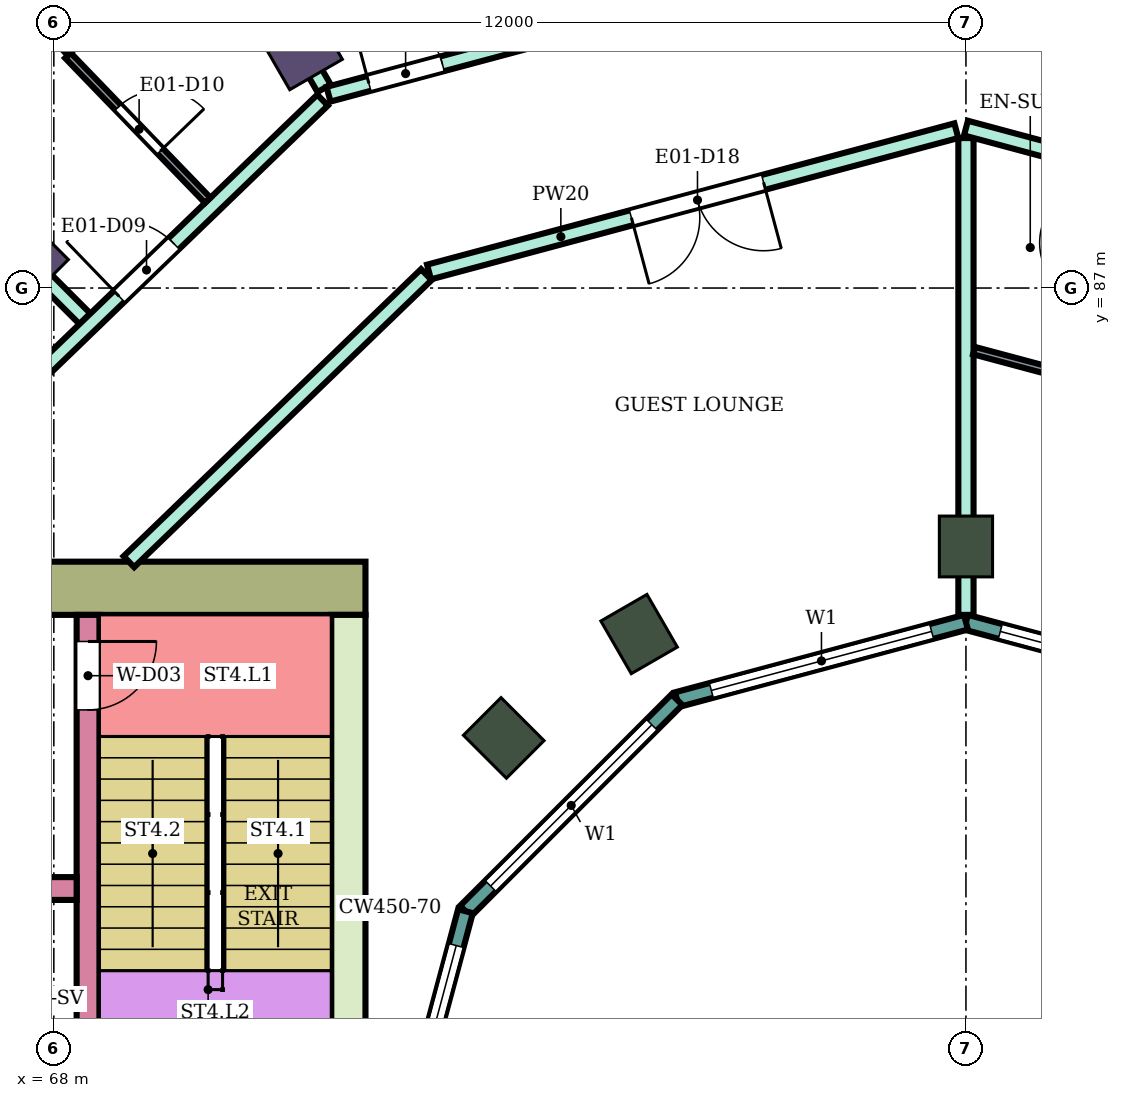
"""IFC4 building model, lengths in metres.
Left out: names, types, materials, properties, quantities, classifications, styles, units other than length and angle.
Written with IfcOpenShell. Run it as: python <this file> out.ifc"""

import sys

from ifc_helpers import new_model, si_unit, direction, frame, frame_2d, origin, origin_2d, place, context, subcontext, project, spatial, rectangle, extrude, element, fill, save


model = new_model("IFC4")
c1 = context("Model", 3, precision=1e-05, world=origin(), true_north=direction((0.0, 1.0)))
c2 = subcontext(c1, "Body", "Model", "MODEL_VIEW")
j1 = project(units=[si_unit("LENGTHUNIT", "METRE"), si_unit("PLANEANGLEUNIT", "RADIAN")], contexts=[c1])
p1 = place(None, origin())
s1 = spatial("IfcSite", under=j1, at=p1, CompositionType="ELEMENT")
p2 = place(p1, origin())
s2 = spatial("IfcBuilding", under=s1, at=p2, CompositionType="ELEMENT")
p3 = place(p2, frame((0.0, 0.0, 114.6)))
s3 = spatial("IfcBuildingStorey", under=s2, at=p3, CompositionType="ELEMENT", Elevation=114.6)
for number, where, z_axis, x_axis in (
    (1, (71.2, 90.242, 0.0), (0.0, 0.0, 1.0), (-0.5, 0.866, 0.0)),
    (2, (67.555, 87.445, 0.0), (0.0, 0.0, 1.0), (-0.707, 0.707, 0.0)),
):
    element("IfcColumn", number, at=place(p3, frame(where, z_axis=z_axis, x_axis=x_axis)), inside=s3, PredefinedType="COLUMN", context=c2, shape_type="SweptSolid", body=[
        extrude(rectangle(XDim=1.0, YDim=0.8, at=origin_2d()), origin(), (0.0, 0.0, 1.0), 3.9),
    ])
for number, where, z_axis, x_axis in (
    (3, (80.0, 83.6, 0.0), (0.0, 0.0, 1.0), (0.0, 1.0, 0.0)),
    (4, (75.7, 82.448, 0.0), (0.0, 0.0, 1.0), (-0.5, 0.866, 0.0)),
    (5, (73.919, 81.081, 0.0), (0.0, 0.0, 1.0), (-0.707, 0.707, 0.0)),
):
    element("IfcColumn", number, at=place(p3, frame(where, z_axis=z_axis, x_axis=x_axis)), inside=s3, PredefinedType="COLUMN", context=c2, shape_type="SweptSolid", body=[
        extrude(rectangle(XDim=0.8, YDim=0.7, at=origin_2d()), origin(), (0.0, 0.0, 1.0), 3.9),
    ])
p4 = place(p3, frame((72.1, 83.05, 0.0), z_axis=(0.0, 0.0, 1.0), x_axis=(-1.0, 0.0, 0.0)))
e6 = element("IfcWall", 6, at=p4, inside=s3, PredefinedType="SHEAR", context=c2, shape_type="SweptSolid", body=[
    extrude(rectangle(XDim=14.8, YDim=0.7, at=frame_2d((7.4, 0.0))), origin(), (0.0, 0.0, 1.0), 3.58),
])
p5 = place(p4, frame((4.2, 0.0, 0.0)))
e7 = element("IfcOpeningElement", 7, at=p5, cuts=e6, PredefinedType="OPENING", context=c2, shape_type="SweptSolid", body=[
    extrude(rectangle(XDim=2.4, YDim=2.4, at=frame_2d((1.2, 1.2))), frame((0.0, 0.36, 0.0), z_axis=(0.0, -1.0, 0.0), x_axis=(1.0, 0.0, 0.0)), (0.0, 0.0, 1.0), 0.72),
])
p6 = place(p3, frame((71.875, 82.7, 0.0), z_axis=(0.0, 0.0, 1.0), x_axis=(0.0, -1.0, 0.0)))
e8 = element("IfcWall", 8, at=p6, inside=s3, PredefinedType="SHEAR", context=c2, shape_type="SweptSolid", body=[
    extrude(rectangle(XDim=7.7, YDim=0.45, at=frame_2d((3.85, 0.0))), origin(), (0.0, 0.0, 1.0), 3.58),
])
p7 = place(p3, frame((68.45, 82.7, 0.0), z_axis=(0.0, 0.0, 1.0), x_axis=(0.0, -1.0, 0.0)))
e9 = element("IfcWall", 9, at=p7, inside=s3, PredefinedType="SHEAR", context=c2, shape_type="SweptSolid", body=[
    extrude(rectangle(XDim=7.7, YDim=0.3, at=frame_2d((3.85, 0.0))), origin(), (0.0, 0.0, 1.0), 3.58),
])
p8 = place(p7, frame((0.35, 0.0, 0.0)))
e10 = element("IfcOpeningElement", 10, at=p8, cuts=e9, PredefinedType="OPENING", context=c2, shape_type="SweptSolid", body=[
    extrude(rectangle(XDim=0.9, YDim=2.1, at=frame_2d((0.45, 1.05))), frame((0.0, 0.16, 0.0), z_axis=(0.0, -1.0, 0.0), x_axis=(1.0, 0.0, 0.0)), (0.0, 0.0, 1.0), 0.32),
])
p9 = place(p3, frame((68.3, 79.1, 0.0), z_axis=(0.0, 0.0, 1.0), x_axis=(-1.0, 0.0, 0.0)))
e11 = element("IfcWall", 11, at=p9, inside=s3, PredefinedType="SHEAR", context=c2, shape_type="SweptSolid", body=[
    extrude(rectangle(XDim=11.0, YDim=0.3, at=frame_2d((5.5, 0.0))), origin(), (0.0, 0.0, 1.0), 3.58),
])
p10 = place(p9, frame((0.4, 0.0, 0.0)))
e12 = element("IfcOpeningElement", 12, at=p10, cuts=e11, PredefinedType="OPENING", context=c2, shape_type="SweptSolid", body=[
    extrude(rectangle(XDim=1.4, YDim=2.1, at=frame_2d((0.7, 1.05))), frame((0.0, 0.16, 0.0), z_axis=(0.0, -1.0, 0.0), x_axis=(1.0, 0.0, 0.0)), (0.0, 0.0, 1.0), 0.32),
])
p11 = place(p9, frame((5.4, 0.0, 0.0)))
e13 = element("IfcOpeningElement", 13, at=p11, cuts=e11, PredefinedType="OPENING", context=c2, shape_type="SweptSolid", body=[
    extrude(rectangle(XDim=1.4, YDim=2.1, at=frame_2d((0.7, 1.05))), frame((0.0, 0.16, 0.0), z_axis=(0.0, -1.0, 0.0), x_axis=(1.0, 0.0, 0.0)), (0.0, 0.0, 1.0), 0.32),
])
p12 = place(p9, frame((8.1, 0.0, 0.0)))
e14 = element("IfcOpeningElement", 14, at=p12, cuts=e11, PredefinedType="OPENING", context=c2, shape_type="SweptSolid", body=[
    extrude(rectangle(XDim=1.0, YDim=2.1, at=frame_2d((0.5, 1.05))), frame((0.0, 0.16, 0.0), z_axis=(0.0, -1.0, 0.0), x_axis=(1.0, 0.0, 0.0)), (0.0, 0.0, 1.0), 0.32),
])
p13 = place(p3, frame((83.802, 81.585, 0.0), z_axis=(0.0, 0.0, 1.0), x_axis=(-0.965933654434, 0.258789828301, 0.0)))
e15 = element("IfcWall", 15, at=p13, inside=s3, PredefinedType="NOTDEFINED", context=c2, shape_type="SweptSolid", body=[
    extrude(rectangle(XDim=3.936, YDim=0.2, at=frame_2d((1.968, 0.0))), origin(), (0.0, 0.0, 1.0), 3.9),
])
p14 = place(p13, frame((0.468, 0.0, 0.9)))
e16 = element("IfcOpeningElement", 16, at=p14, cuts=e15, PredefinedType="OPENING", context=c2, shape_type="SweptSolid", body=[
    extrude(rectangle(XDim=3.0, YDim=2.3, at=frame_2d((1.5, 1.15))), frame((0.0, 0.11, 0.0), z_axis=(0.0, -1.0, 0.0), x_axis=(1.0, 0.0, 0.0)), (0.0, 0.0, 1.0), 0.22),
])
p15 = place(p3, frame((80.0, 82.604, 0.0), z_axis=(0.0, 0.0, 1.0), x_axis=(-0.965933654434, -0.258789828301, 0.0)))
e17 = element("IfcWall", 17, at=p15, inside=s3, PredefinedType="NOTDEFINED", context=c2, shape_type="SweptSolid", body=[
    extrude(rectangle(XDim=3.936, YDim=0.2, at=frame_2d((1.968, 0.0))), origin(), (0.0, 0.0, 1.0), 3.9),
])
p16 = place(p15, frame((0.468, 0.0, 0.9)))
e18 = element("IfcOpeningElement", 18, at=p16, cuts=e17, PredefinedType="OPENING", context=c2, shape_type="SweptSolid", body=[
    extrude(rectangle(XDim=3.0, YDim=2.3, at=frame_2d((1.5, 1.15))), frame((0.0, 0.11, 0.0), z_axis=(0.0, -1.0, 0.0), x_axis=(1.0, 0.0, 0.0)), (0.0, 0.0, 1.0), 0.22),
])
p17 = place(p3, frame((76.198, 81.585, 0.0), z_axis=(0.0, 0.0, 1.0), x_axis=(-0.707106781187, -0.707106781187, 0.0)))
e19 = element("IfcWall", 19, at=p17, inside=s3, PredefinedType="NOTDEFINED", context=c2, shape_type="SweptSolid", body=[
    extrude(rectangle(XDim=3.936, YDim=0.2, at=frame_2d((1.968, 0.0))), origin(), (0.0, 0.0, 1.0), 3.9),
])
p18 = place(p17, frame((0.468, 0.0, 0.9)))
e20 = element("IfcOpeningElement", 20, at=p18, cuts=e19, PredefinedType="OPENING", context=c2, shape_type="SweptSolid", body=[
    extrude(rectangle(XDim=3.0, YDim=2.3, at=frame_2d((1.5, 1.15))), frame((0.0, 0.11, 0.0), z_axis=(0.0, -1.0, 0.0), x_axis=(1.0, 0.0, 0.0)), (0.0, 0.0, 1.0), 0.22),
])
p19 = place(p3, frame((73.415, 78.802, 0.0), z_axis=(0.0, 0.0, 1.0), x_axis=(-0.258789828301, -0.965933654434, 0.0)))
e21 = element("IfcWall", 21, at=p19, inside=s3, PredefinedType="NOTDEFINED", context=c2, shape_type="SweptSolid", body=[
    extrude(rectangle(XDim=3.936, YDim=0.2, at=frame_2d((1.968, 0.0))), origin(), (0.0, 0.0, 1.0), 3.9),
])
p20 = place(p19, frame((0.468, 0.0, 0.9)))
e22 = element("IfcOpeningElement", 22, at=p20, cuts=e21, PredefinedType="OPENING", context=c2, shape_type="SweptSolid", body=[
    extrude(rectangle(XDim=3.0, YDim=2.3, at=frame_2d((1.5, 1.15))), frame((0.0, 0.11, 0.0), z_axis=(0.0, -1.0, 0.0), x_axis=(1.0, 0.0, 0.0)), (0.0, 0.0, 1.0), 0.22),
])
p21 = place(p3, frame((63.598, 91.408, 0.0), z_axis=(0.0, 0.0, 1.0), x_axis=(0.706963264491, -0.707250268759, 0.0)))
e23 = element("IfcWall", 23, at=p21, inside=s3, PredefinedType="PARTITIONING", context=c2, shape_type="SweptSolid", body=[
    extrude(rectangle(XDim=6.805, YDim=0.2, at=frame_2d((3.403, 0.0))), origin(), (0.0, 0.0, 1.0), 3.45),
])
p22 = place(p3, frame((66.797, 84.9, 0.0), z_axis=(0.0, 0.0, 1.0), x_axis=(0.719692092412, 0.694293376116, 0.0)))
e24 = element("IfcWall", 24, at=p22, inside=s3, PredefinedType="PARTITIONING", context=c2, shape_type="SweptSolid", body=[
    extrude(rectangle(XDim=6.584, YDim=0.2, at=frame_2d((3.292, 0.0))), origin(), (0.0, 0.0, 1.0), 3.45),
])
p23 = place(p22, frame((2.866, 0.0, 0.0)))
e25 = element("IfcOpeningElement", 25, at=p23, cuts=e24, PredefinedType="OPENING", context=c2, shape_type="SweptSolid", body=[
    extrude(rectangle(XDim=1.0, YDim=2.1, at=frame_2d((0.5, 1.05))), frame((0.0, 0.11, 0.0), z_axis=(0.0, -1.0, 0.0), x_axis=(1.0, 0.0, 0.0)), (0.0, 0.0, 1.0), 0.22),
])
p24 = place(p3, frame((67.102, 97.342, 0.0), z_axis=(0.0, 0.0, 1.0), x_axis=(0.499927298089, -0.866067374183, 0.0)))
e26 = element("IfcWall", 26, at=p24, inside=s3, PredefinedType="PARTITIONING", context=c2, shape_type="SweptSolid", body=[
    extrude(rectangle(XDim=8.907, YDim=0.2, at=frame_2d((4.454, 0.0))), origin(), (0.0, 0.0, 1.0), 3.45),
])
p25 = place(p3, frame((68.987, 83.4, 0.0), z_axis=(0.0, 0.0, 1.0), x_axis=(0.719586298962, 0.694403022997, 0.0)))
e27 = element("IfcWall", 27, at=p25, inside=s3, PredefinedType="PARTITIONING", context=c2, shape_type="SweptSolid", body=[
    extrude(rectangle(XDim=5.439, YDim=0.2, at=frame_2d((2.719, 0.0))), origin(), (0.0, 0.0, 1.0), 3.45),
])
p26 = place(p3, frame((71.614, 89.55, 0.0), z_axis=(0.0, 0.0, 1.0), x_axis=(0.965967958589, 0.258661753994, 0.0)))
e28 = element("IfcWall", 28, at=p26, inside=s3, PredefinedType="PARTITIONING", context=c2, shape_type="SweptSolid", body=[
    extrude(rectangle(XDim=8.592, YDim=0.2, at=frame_2d((4.296, 0.0))), origin(), (0.0, 0.0, 1.0), 3.45),
])
p27 = place(p26, frame((0.55, 0.0, 0.0)))
e29 = element("IfcOpeningElement", 29, at=p27, cuts=e28, PredefinedType="OPENING", context=c2, shape_type="SweptSolid", body=[
    extrude(rectangle(XDim=1.0, YDim=2.1, at=frame_2d((0.5, 1.05))), frame((0.0, 0.11, 0.0), z_axis=(0.0, -1.0, 0.0), x_axis=(1.0, 0.0, 0.0)), (0.0, 0.0, 1.0), 0.22),
])
p28 = place(p3, frame((72.936, 87.211, 0.0), z_axis=(0.0, 0.0, 1.0), x_axis=(0.965917703859, 0.258849356521, 0.0)))
e30 = element("IfcWall", 30, at=p28, inside=s3, PredefinedType="PARTITIONING", context=c2, shape_type="SweptSolid", body=[
    extrude(rectangle(XDim=7.182, YDim=0.2, at=frame_2d((3.591, 0.0))), origin(), (0.0, 0.0, 1.0), 3.45),
])
p29 = place(p28, frame((2.757, 0.0, 0.0)))
e31 = element("IfcOpeningElement", 31, at=p29, cuts=e30, PredefinedType="OPENING", context=c2, shape_type="SweptSolid", body=[
    extrude(rectangle(XDim=1.8, YDim=2.1, at=frame_2d((0.9, 1.05))), frame((0.0, 0.11, 0.0), z_axis=(0.0, -1.0, 0.0), x_axis=(1.0, 0.0, 0.0)), (0.0, 0.0, 1.0), 0.22),
])
p30 = place(p3, frame((80.0, 82.7, 0.0), z_axis=(0.0, 0.0, 1.0), x_axis=(0.0, 1.0, 0.0)))
e32 = element("IfcWall", 32, at=p30, inside=s3, PredefinedType="PARTITIONING", context=c2, shape_type="SweptSolid", body=[
    extrude(rectangle(XDim=6.273, YDim=0.2, at=frame_2d((3.136, 0.0))), origin(), (0.0, 0.0, 1.0), 3.45),
])
p31 = place(p3, frame((80.0, 89.104, 0.0), z_axis=(0.0, 0.0, 1.0), x_axis=(0.965856548257, -0.259077455964, 0.0)))
e33 = element("IfcWall", 33, at=p31, inside=s3, PredefinedType="PARTITIONING", context=c2, shape_type="SweptSolid", body=[
    extrude(rectangle(XDim=7.173, YDim=0.2, at=frame_2d((3.586, 0.0))), origin(), (0.0, 0.0, 1.0), 3.45),
])
p32 = place(p31, frame((5.763, 0.0, 0.0)))
e34 = element("IfcOpeningElement", 34, at=p32, cuts=e33, PredefinedType="OPENING", context=c2, shape_type="SweptSolid", body=[
    extrude(rectangle(XDim=1.0, YDim=2.1, at=frame_2d((0.5, 1.05))), frame((0.0, 0.11, 0.0), z_axis=(0.0, -1.0, 0.0), x_axis=(1.0, 0.0, 0.0)), (0.0, 0.0, 1.0), 0.22),
])
p33 = place(p3, frame((80.0, 91.797, 0.0), z_axis=(0.0, 0.0, 1.0), x_axis=(0.965857042792, -0.259075612301, 0.0)))
e35 = element("IfcWall", 35, at=p33, inside=s3, PredefinedType="PARTITIONING", context=c2, shape_type="SweptSolid", body=[
    extrude(rectangle(XDim=8.602, YDim=0.2, at=frame_2d((4.301, 0.0))), origin(), (0.0, 0.0, 1.0), 3.45),
])
p34 = place(p33, frame((4.877, 0.0, 0.0)))
e36 = element("IfcOpeningElement", 36, at=p34, cuts=e35, PredefinedType="OPENING", context=c2, shape_type="SweptSolid", body=[
    extrude(rectangle(XDim=1.0, YDim=2.1, at=frame_2d((0.5, 1.05))), frame((0.0, 0.11, 0.0), z_axis=(0.0, -1.0, 0.0), x_axis=(1.0, 0.0, 0.0)), (0.0, 0.0, 1.0), 0.22),
])
p35 = place(p33, frame((2.817, 0.0, 0.0)))
e37 = element("IfcOpeningElement", 37, at=p35, cuts=e35, PredefinedType="OPENING", context=c2, shape_type="SweptSolid", body=[
    extrude(rectangle(XDim=1.0, YDim=2.1, at=frame_2d((0.5, 1.05))), frame((0.0, 0.11, 0.0), z_axis=(0.0, -1.0, 0.0), x_axis=(1.0, 0.0, 0.0)), (0.0, 0.0, 1.0), 0.22),
])
p36 = place(p3, frame((68.185, 90.06, 0.0), z_axis=(0.0, 0.0, 1.0), x_axis=(0.69446127412, -0.719530081892, 0.0)))
e38 = element("IfcWall", 38, at=p36, inside=s3, PredefinedType="PARTITIONING", context=c2, shape_type="SweptSolid", body=[
    extrude(rectangle(XDim=2.649, YDim=0.1, at=frame_2d((1.324, 0.0))), origin(), (0.0, 0.0, 1.0), 3.45),
])
p37 = place(p36, frame((0.95, 0.0, 0.0)))
e39 = element("IfcOpeningElement", 39, at=p37, cuts=e38, PredefinedType="OPENING", context=c2, shape_type="SweptSolid", body=[
    extrude(rectangle(XDim=0.8, YDim=2.1, at=frame_2d((0.4, 1.05))), frame((0.0, 0.06, 0.0), z_axis=(0.0, -1.0, 0.0), x_axis=(1.0, 0.0, 0.0)), (0.0, 0.0, 1.0), 0.12),
])
p38 = place(p3, frame((68.15, 90.096, 0.0), z_axis=(0.0, 0.0, 1.0), x_axis=(0.719667544954, 0.694318820672, 0.0)))
e40 = element("IfcWall", 40, at=p38, inside=s3, PredefinedType="PARTITIONING", context=c2, shape_type="SweptSolid", body=[
    extrude(rectangle(XDim=2.687, YDim=0.1, at=frame_2d((1.344, 0.0))), origin(), (0.0, 0.0, 1.0), 3.45),
])
p39 = place(p3, frame((80.106, 86.177, 0.0), z_axis=(0.0, 0.0, 1.0), x_axis=(0.966002973184, -0.258530957139, 0.0)))
e41 = element("IfcWall", 41, at=p39, inside=s3, PredefinedType="PARTITIONING", context=c2, shape_type="SweptSolid", body=[
    extrude(rectangle(XDim=1.19, YDim=0.1, at=frame_2d((0.595, 0.0))), origin(), (0.0, 0.0, 1.0), 3.45),
])
p40 = place(p14, origin())
e42 = element("IfcWindow", 42, at=p40, inside=s3, PartitioningType="SINGLE_PANEL", PredefinedType="WINDOW", context=c2, shape_type="SweptSolid", body=[
    extrude(rectangle(XDim=3.0, YDim=2.3, at=frame_2d((1.5, 1.15))), frame((0.0, 0.03, 0.0), z_axis=(0.0, -1.0, 0.0), x_axis=(1.0, 0.0, 0.0)), (0.0, 0.0, 1.0), 0.06),
])
fill(e16, e42)
p41 = place(p16, origin())
e43 = element("IfcWindow", 43, at=p41, inside=s3, PartitioningType="SINGLE_PANEL", PredefinedType="WINDOW", context=c2, shape_type="SweptSolid", body=[
    extrude(rectangle(XDim=3.0, YDim=2.3, at=frame_2d((1.5, 1.15))), frame((0.0, 0.03, 0.0), z_axis=(0.0, -1.0, 0.0), x_axis=(1.0, 0.0, 0.0)), (0.0, 0.0, 1.0), 0.06),
])
fill(e18, e43)
p42 = place(p18, origin())
e44 = element("IfcWindow", 44, at=p42, inside=s3, PartitioningType="SINGLE_PANEL", PredefinedType="WINDOW", context=c2, shape_type="SweptSolid", body=[
    extrude(rectangle(XDim=3.0, YDim=2.3, at=frame_2d((1.5, 1.15))), frame((0.0, 0.03, 0.0), z_axis=(0.0, -1.0, 0.0), x_axis=(1.0, 0.0, 0.0)), (0.0, 0.0, 1.0), 0.06),
])
fill(e20, e44)
p43 = place(p20, origin())
e45 = element("IfcWindow", 45, at=p43, inside=s3, PartitioningType="SINGLE_PANEL", PredefinedType="WINDOW", context=c2, shape_type="SweptSolid", body=[
    extrude(rectangle(XDim=3.0, YDim=2.3, at=frame_2d((1.5, 1.15))), frame((0.0, 0.03, 0.0), z_axis=(0.0, -1.0, 0.0), x_axis=(1.0, 0.0, 0.0)), (0.0, 0.0, 1.0), 0.06),
])
fill(e22, e45)
p44 = place(p27, origin())
e46 = element("IfcDoor", 46, at=p44, inside=s3, OperationType="SINGLE_SWING_LEFT", PredefinedType="DOOR", context=c2, shape_type="SweptSolid", body=[
    extrude(rectangle(XDim=1.0, YDim=2.1, at=frame_2d((0.5, 1.05))), frame((0.0, 0.025, 0.0), z_axis=(0.0, -1.0, 0.0), x_axis=(1.0, 0.0, 0.0)), (0.0, 0.0, 1.0), 0.05),
])
fill(e29, e46)
p45 = place(p23, origin())
e47 = element("IfcDoor", 47, at=p45, inside=s3, OperationType="SINGLE_SWING_LEFT", PredefinedType="DOOR", context=c2, shape_type="SweptSolid", body=[
    extrude(rectangle(XDim=1.0, YDim=2.1, at=frame_2d((0.5, 1.05))), frame((0.0, 0.025, 0.0), z_axis=(0.0, -1.0, 0.0), x_axis=(1.0, 0.0, 0.0)), (0.0, 0.0, 1.0), 0.05),
])
fill(e25, e47)
p46 = place(p37, origin())
e48 = element("IfcDoor", 48, at=p46, inside=s3, OperationType="SINGLE_SWING_RIGHT", PredefinedType="DOOR", context=c2, shape_type="SweptSolid", body=[
    extrude(rectangle(XDim=0.8, YDim=2.1, at=frame_2d((0.4, 1.05))), frame((0.0, 0.025, 0.0), z_axis=(0.0, -1.0, 0.0), x_axis=(1.0, 0.0, 0.0)), (0.0, 0.0, 1.0), 0.05),
])
fill(e39, e48)
p47 = place(p29, frame((1.8, 0.0, 0.0), z_axis=(0.0, 0.0, 1.0), x_axis=(-1.0, 0.0, 0.0)))
e49 = element("IfcDoor", 49, at=p47, inside=s3, OperationType="DOUBLE_DOOR_SINGLE_SWING", PredefinedType="DOOR", context=c2, shape_type="SweptSolid", body=[
    extrude(rectangle(XDim=1.8, YDim=2.1, at=frame_2d((0.9, 1.05))), frame((0.0, 0.025, 0.0), z_axis=(0.0, -1.0, 0.0), x_axis=(1.0, 0.0, 0.0)), (0.0, 0.0, 1.0), 0.05),
])
fill(e31, e49)
p48 = place(p8, origin())
e50 = element("IfcDoor", 50, at=p48, inside=s3, OperationType="SINGLE_SWING_LEFT", PredefinedType="DOOR", context=c2, shape_type="SweptSolid", body=[
    extrude(rectangle(XDim=0.9, YDim=2.1, at=frame_2d((0.45, 1.05))), frame((0.0, 0.025, 0.0), z_axis=(0.0, -1.0, 0.0), x_axis=(1.0, 0.0, 0.0)), (0.0, 0.0, 1.0), 0.05),
])
fill(e10, e50)
save(model, sys.argv[1])
